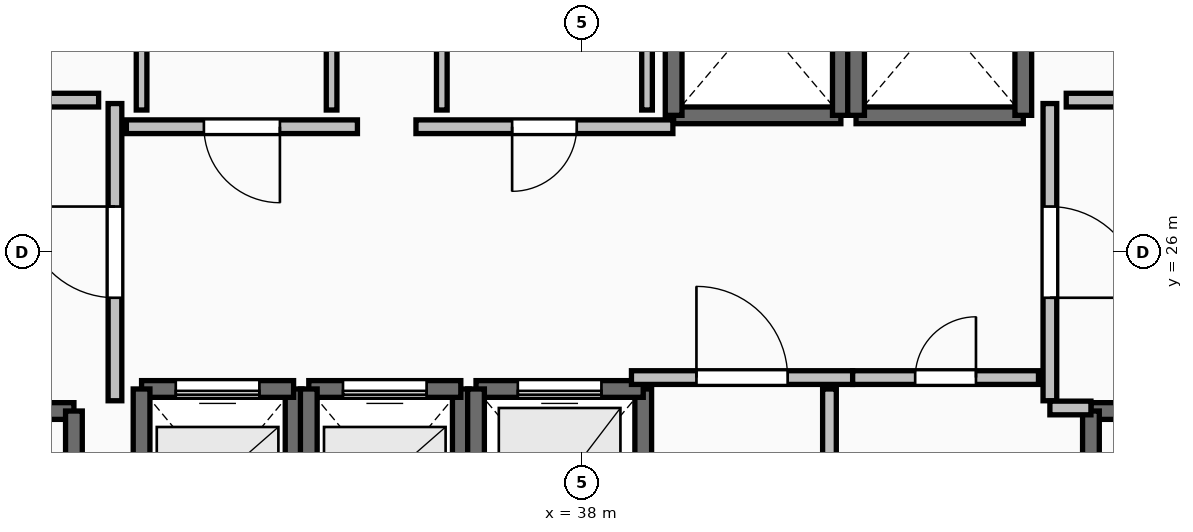
"""IFC4 building model, lengths in metres.
Left out: names, types, materials, properties, quantities, classifications, styles, units other than length and angle.
Written with IfcOpenShell. Run it as: python <this file> out.ifc"""

import sys

from ifc_helpers import new_model, si_unit, direction, frame, frame_2d, origin, place, context, subcontext, project, spatial, rectangle, extrude, element, fill, save


model = new_model("IFC4")
c1 = context("Model", 3, precision=1e-05, world=origin(), true_north=direction((0.0, 1.0)))
c2 = subcontext(c1, "Body", "Model", "MODEL_VIEW")
j1 = project(units=[si_unit("LENGTHUNIT", "METRE"), si_unit("PLANEANGLEUNIT", "RADIAN")], contexts=[c1])
p1 = place(None, origin())
s1 = spatial("IfcSite", under=j1, at=p1, CompositionType="ELEMENT")
p2 = place(p1, origin())
s2 = spatial("IfcBuilding", under=s1, at=p2, CompositionType="ELEMENT")
p3 = place(p2, frame((0.0, 0.0, 171.1)))
s3 = spatial("IfcBuildingStorey", under=s2, at=p3, CompositionType="ELEMENT", Elevation=171.1)
p4 = place(p3, frame((27.94, 23.91, 0.0), z_axis=(0.0, 0.0, 1.0), x_axis=(1.0, 0.0, 0.0)))
e1 = element("IfcWall", 1, at=p4, inside=s3, PredefinedType="SOLIDWALL", context=c2, shape_type="SweptSolid", body=[
    extrude(rectangle(XDim=3.37, YDim=0.22, at=frame_2d((1.685, 0.0))), origin(), (0.0, 0.0, 1.0), 3.2),
])
p5 = place(p4, frame((1.135, 0.0, 0.0)))
e2 = element("IfcOpeningElement", 2, at=p5, cuts=e1, PredefinedType="OPENING", context=c2, shape_type="SweptSolid", body=[
    extrude(rectangle(XDim=1.1, YDim=2.15, at=frame_2d((0.55, 1.075))), frame((0.0, 0.125, 0.0), z_axis=(0.0, -1.0, 0.0), x_axis=(1.0, 0.0, 0.0)), (0.0, 0.0, 1.0), 0.25),
])
p6 = place(p3, frame((31.31, 23.91, 0.0), z_axis=(0.0, 0.0, 1.0), x_axis=(0.0, -1.0, 0.0)))
e3 = element("IfcWall", 3, at=p6, inside=s3, PredefinedType="SOLIDWALL", context=c2, shape_type="SweptSolid", body=[
    extrude(rectangle(XDim=7.42, YDim=0.22, at=frame_2d((3.71, 0.0))), origin(), (0.0, 0.0, 1.0), 3.2),
])
p7 = place(p3, frame((44.69, 23.91, 0.0), z_axis=(0.0, 0.0, 1.0), x_axis=(1.0, 0.0, 0.0)))
e4 = element("IfcWall", 4, at=p7, inside=s3, PredefinedType="SOLIDWALL", context=c2, shape_type="SweptSolid", body=[
    extrude(rectangle(XDim=3.37, YDim=0.22, at=frame_2d((1.685, 0.0))), origin(), (0.0, 0.0, 1.0), 3.2),
])
p8 = place(p7, frame((1.135, 0.0, 0.0)))
e5 = element("IfcOpeningElement", 5, at=p8, cuts=e4, PredefinedType="OPENING", context=c2, shape_type="SweptSolid", body=[
    extrude(rectangle(XDim=1.1, YDim=2.15, at=frame_2d((0.55, 1.075))), frame((0.0, 0.125, 0.0), z_axis=(0.0, -1.0, 0.0), x_axis=(1.0, 0.0, 0.0)), (0.0, 0.0, 1.0), 0.25),
])
p9 = place(p3, frame((44.69, 16.49, 0.0), z_axis=(0.0, 0.0, 1.0), x_axis=(0.0, 1.0, 0.0)))
e6 = element("IfcWall", 6, at=p9, inside=s3, PredefinedType="SOLIDWALL", context=c2, shape_type="SweptSolid", body=[
    extrude(rectangle(XDim=7.42, YDim=0.22, at=frame_2d((3.71, 0.0))), origin(), (0.0, 0.0, 1.0), 3.2),
])
p10 = place(p3, frame((34.2, 21.8, 0.0), z_axis=(0.0, 0.0, 1.0), x_axis=(0.0, 1.0, 0.0)))
e7 = element("IfcWall", 7, at=p10, inside=s3, PredefinedType="SOLIDWALL", context=c2, shape_type="SweptSolid", body=[
    extrude(rectangle(XDim=2.4, YDim=0.22, at=frame_2d((1.2, 0.0))), origin(), (0.0, 0.0, 1.0), 3.2),
])
p11 = place(p3, frame((34.2, 24.2, 0.0), z_axis=(0.0, 0.0, 1.0), x_axis=(-1.0, 0.0, 0.0)))
e8 = element("IfcWall", 8, at=p11, inside=s3, PredefinedType="SOLIDWALL", context=c2, shape_type="SweptSolid", body=[
    extrude(rectangle(XDim=2.0, YDim=0.22, at=frame_2d((1.0, 0.0))), origin(), (0.0, 0.0, 1.0), 3.2),
])
p12 = place(p11, frame((0.45, 0.0, 0.0)))
e9 = element("IfcOpeningElement", 9, at=p12, cuts=e8, PredefinedType="OPENING", context=c2, shape_type="SweptSolid", body=[
    extrude(rectangle(XDim=1.1, YDim=2.2, at=frame_2d((0.55, 1.1))), frame((0.0, 0.125, 0.0), z_axis=(0.0, -1.0, 0.0), x_axis=(1.0, 0.0, 0.0)), (0.0, 0.0, 1.0), 0.25),
])
for number, where, z_axis, x_axis in (
    (10, (32.2, 24.2, 0.0), (0.0, 0.0, 1.0), (0.0, -1.0, 0.0)),
    (11, (36.4, 21.8, 0.0), (0.0, 0.0, 1.0), (0.0, 1.0, 0.0)),
):
    element("IfcWall", number, at=place(p3, frame(where, z_axis=z_axis, x_axis=x_axis)), inside=s3, PredefinedType="SOLIDWALL", context=c2, shape_type="SweptSolid", body=[
        extrude(rectangle(XDim=2.4, YDim=0.22, at=frame_2d((1.2, 0.0))), origin(), (0.0, 0.0, 1.0), 3.2),
    ])
p13 = place(p3, frame((36.4, 24.2, 0.0), z_axis=(0.0, 0.0, 1.0), x_axis=(-1.0, 0.0, 0.0)))
e12 = element("IfcWall", 12, at=p13, inside=s3, PredefinedType="SOLIDWALL", context=c2, shape_type="SweptSolid", body=[
    extrude(rectangle(XDim=2.0, YDim=0.22, at=frame_2d((1.0, 0.0))), origin(), (0.0, 0.0, 1.0), 3.2),
])
p14 = place(p13, frame((0.45, 0.0, 0.0)))
e13 = element("IfcOpeningElement", 13, at=p14, cuts=e12, PredefinedType="OPENING", context=c2, shape_type="SweptSolid", body=[
    extrude(rectangle(XDim=1.1, YDim=2.2, at=frame_2d((0.55, 1.1))), frame((0.0, 0.125, 0.0), z_axis=(0.0, -1.0, 0.0), x_axis=(1.0, 0.0, 0.0)), (0.0, 0.0, 1.0), 0.25),
])
p15 = place(p3, frame((34.4, 24.2, 0.0), z_axis=(0.0, 0.0, 1.0), x_axis=(0.0, -1.0, 0.0)))
e14 = element("IfcWall", 14, at=p15, inside=s3, PredefinedType="SOLIDWALL", context=c2, shape_type="SweptSolid", body=[
    extrude(rectangle(XDim=2.4, YDim=0.22, at=frame_2d((1.2, 0.0))), origin(), (0.0, 0.0, 1.0), 3.2),
])
p16 = place(p3, frame((38.8, 21.6, 0.0), z_axis=(0.0, 0.0, 1.0), x_axis=(0.0, 1.0, 0.0)))
e15 = element("IfcWall", 15, at=p16, inside=s3, PredefinedType="SOLIDWALL", context=c2, shape_type="SweptSolid", body=[
    extrude(rectangle(XDim=2.6, YDim=0.22, at=frame_2d((1.3, 0.0))), origin(), (0.0, 0.0, 1.0), 3.2),
])
p17 = place(p3, frame((38.8, 24.2, 0.0), z_axis=(0.0, 0.0, 1.0), x_axis=(-1.0, 0.0, 0.0)))
e16 = element("IfcWall", 16, at=p17, inside=s3, PredefinedType="SOLIDWALL", context=c2, shape_type="SweptSolid", body=[
    extrude(rectangle(XDim=2.2, YDim=0.22, at=frame_2d((1.1, 0.0))), origin(), (0.0, 0.0, 1.0), 3.2),
])
p18 = place(p17, frame((0.55, 0.0, 0.0)))
e17 = element("IfcOpeningElement", 17, at=p18, cuts=e16, PredefinedType="OPENING", context=c2, shape_type="SweptSolid", body=[
    extrude(rectangle(XDim=1.1, YDim=2.2, at=frame_2d((0.55, 1.1))), frame((0.0, 0.125, 0.0), z_axis=(0.0, -1.0, 0.0), x_axis=(1.0, 0.0, 0.0)), (0.0, 0.0, 1.0), 0.25),
])
p19 = place(p3, frame((36.6, 24.2, 0.0), z_axis=(0.0, 0.0, 1.0), x_axis=(0.0, -1.0, 0.0)))
e18 = element("IfcWall", 18, at=p19, inside=s3, PredefinedType="SOLIDWALL", context=c2, shape_type="SweptSolid", body=[
    extrude(rectangle(XDim=2.6, YDim=0.22, at=frame_2d((1.3, 0.0))), origin(), (0.0, 0.0, 1.0), 3.2),
])
p20 = place(p3, frame((39.2, 27.8, 0.0), z_axis=(0.0, 0.0, 1.0), x_axis=(1.0, 0.0, 0.0)))
e19 = element("IfcWall", 19, at=p20, inside=s3, PredefinedType="SOLIDWALL", context=c2, shape_type="SweptSolid", body=[
    extrude(rectangle(XDim=2.2, YDim=0.22, at=frame_2d((1.1, 0.0))), origin(), (0.0, 0.0, 1.0), 3.2),
])
for number, where, z_axis, x_axis in (
    (20, (41.4, 27.8, 0.0), (0.0, 0.0, 1.0), (0.0, 1.0, 0.0)),
    (21, (39.2, 30.4, 0.0), (0.0, 0.0, 1.0), (0.0, -1.0, 0.0)),
):
    element("IfcWall", number, at=place(p3, frame(where, z_axis=z_axis, x_axis=x_axis)), inside=s3, PredefinedType="SOLIDWALL", context=c2, shape_type="SweptSolid", body=[
        extrude(rectangle(XDim=2.6, YDim=0.22, at=frame_2d((1.3, 0.0))), origin(), (0.0, 0.0, 1.0), 3.2),
    ])
p21 = place(p3, frame((41.6, 27.8, 0.0), z_axis=(0.0, 0.0, 1.0), x_axis=(1.0, 0.0, 0.0)))
e22 = element("IfcWall", 22, at=p21, inside=s3, PredefinedType="SOLIDWALL", context=c2, shape_type="SweptSolid", body=[
    extrude(rectangle(XDim=2.2, YDim=0.22, at=frame_2d((1.1, 0.0))), origin(), (0.0, 0.0, 1.0), 3.2),
])
for number, where, z_axis, x_axis in (
    (23, (43.8, 27.8, 0.0), (0.0, 0.0, 1.0), (0.0, 1.0, 0.0)),
    (24, (41.6, 30.4, 0.0), (0.0, 0.0, 1.0), (0.0, -1.0, 0.0)),
):
    element("IfcWall", number, at=place(p3, frame(where, z_axis=z_axis, x_axis=x_axis)), inside=s3, PredefinedType="SOLIDWALL", context=c2, shape_type="SweptSolid", body=[
        extrude(rectangle(XDim=2.6, YDim=0.22, at=frame_2d((1.3, 0.0))), origin(), (0.0, 0.0, 1.0), 3.2),
    ])
p22 = place(p3, frame((31.85, 24.045, 0.0), z_axis=(0.0, 0.0, 1.0), x_axis=(0.0, 1.0, 0.0)))
e25 = element("IfcWall", 25, at=p22, inside=s3, PredefinedType="PARTITIONING", context=c2, shape_type="SweptSolid", body=[
    extrude(rectangle(XDim=3.91, YDim=0.18, at=frame_2d((1.955, 0.0))), origin(), (0.0, 0.0, 1.0), 3.2),
])
p23 = place(p22, frame((1.355, 0.0, 0.0)))
e26 = element("IfcOpeningElement", 26, at=p23, cuts=e25, PredefinedType="OPENING", context=c2, shape_type="SweptSolid", body=[
    extrude(rectangle(XDim=1.2, YDim=2.15, at=frame_2d((0.6, 1.075))), frame((0.0, 0.105, 0.0), z_axis=(0.0, -1.0, 0.0), x_axis=(1.0, 0.0, 0.0)), (0.0, 0.0, 1.0), 0.21),
])
p24 = place(p3, frame((44.15, 27.955, 0.0), z_axis=(0.0, 0.0, 1.0), x_axis=(0.0, -1.0, 0.0)))
e27 = element("IfcWall", 27, at=p24, inside=s3, PredefinedType="PARTITIONING", context=c2, shape_type="SweptSolid", body=[
    extrude(rectangle(XDim=3.91, YDim=0.18, at=frame_2d((1.955, 0.0))), origin(), (0.0, 0.0, 1.0), 3.2),
])
p25 = place(p24, frame((1.355, 0.0, 0.0)))
e28 = element("IfcOpeningElement", 28, at=p25, cuts=e27, PredefinedType="OPENING", context=c2, shape_type="SweptSolid", body=[
    extrude(rectangle(XDim=1.2, YDim=2.15, at=frame_2d((0.6, 1.075))), frame((0.0, 0.105, 0.0), z_axis=(0.0, -1.0, 0.0), x_axis=(1.0, 0.0, 0.0)), (0.0, 0.0, 1.0), 0.21),
])
p26 = place(p3, frame((44.15, 23.95, 0.0), z_axis=(0.0, 0.0, 1.0), x_axis=(1.0, 0.0, 0.0)))
e29 = element("IfcWall", 29, at=p26, inside=s3, PredefinedType="PARTITIONING", context=c2, shape_type="SweptSolid", body=[
    extrude(rectangle(XDim=0.54, YDim=0.18, at=frame_2d((0.27, 0.0))), origin(), (0.0, 0.0, 1.0), 3.2),
])
p27 = place(p3, frame((38.645, 24.35, 0.0), z_axis=(0.0, 0.0, 1.0), x_axis=(1.0, 0.0, 0.0)))
e30 = element("IfcWall", 30, at=p27, inside=s3, PredefinedType="PARTITIONING", context=c2, shape_type="SweptSolid", body=[
    extrude(rectangle(XDim=2.91, YDim=0.18, at=frame_2d((1.455, 0.0))), origin(), (0.0, 0.0, 1.0), 3.2),
])
p28 = place(p27, frame((0.855, 0.0, 0.0)))
e31 = element("IfcOpeningElement", 31, at=p28, cuts=e30, PredefinedType="OPENING", context=c2, shape_type="SweptSolid", body=[
    extrude(rectangle(XDim=1.2, YDim=2.15, at=frame_2d((0.6, 1.075))), frame((0.0, 0.105, 0.0), z_axis=(0.0, -1.0, 0.0), x_axis=(1.0, 0.0, 0.0)), (0.0, 0.0, 1.0), 0.21),
])
p29 = place(p3, frame((41.555, 24.35, 0.0), z_axis=(0.0, 0.0, 1.0), x_axis=(1.0, 0.0, 0.0)))
e32 = element("IfcWall", 32, at=p29, inside=s3, PredefinedType="PARTITIONING", context=c2, shape_type="SweptSolid", body=[
    extrude(rectangle(XDim=2.445, YDim=0.18, at=frame_2d((1.223, 0.0))), origin(), (0.0, 0.0, 1.0), 3.2),
])
p30 = place(p29, frame((0.823, 0.0, 0.0)))
e33 = element("IfcOpeningElement", 33, at=p30, cuts=e32, PredefinedType="OPENING", context=c2, shape_type="SweptSolid", body=[
    extrude(rectangle(XDim=0.8, YDim=2.05, at=frame_2d((0.4, 1.025))), frame((0.0, 0.105, 0.0), z_axis=(0.0, -1.0, 0.0), x_axis=(1.0, 0.0, 0.0)), (0.0, 0.0, 1.0), 0.21),
])
p31 = place(p3, frame((35.04, 27.65, 0.0), z_axis=(0.0, 0.0, 1.0), x_axis=(-1.0, 0.0, 0.0)))
e34 = element("IfcWall", 34, at=p31, inside=s3, PredefinedType="PARTITIONING", context=c2, shape_type="SweptSolid", body=[
    extrude(rectangle(XDim=3.04, YDim=0.18, at=frame_2d((1.52, 0.0))), origin(), (0.0, 0.0, 1.0), 3.2),
])
p32 = place(p31, frame((1.02, 0.0, 0.0)))
e35 = element("IfcOpeningElement", 35, at=p32, cuts=e34, PredefinedType="OPENING", context=c2, shape_type="SweptSolid", body=[
    extrude(rectangle(XDim=1.0, YDim=2.15, at=frame_2d((0.5, 1.075))), frame((0.0, 0.105, 0.0), z_axis=(0.0, -1.0, 0.0), x_axis=(1.0, 0.0, 0.0)), (0.0, 0.0, 1.0), 0.21),
])
p33 = place(p3, frame((39.19, 27.65, 0.0), z_axis=(0.0, 0.0, 1.0), x_axis=(-1.0, 0.0, 0.0)))
e36 = element("IfcWall", 36, at=p33, inside=s3, PredefinedType="PARTITIONING", context=c2, shape_type="SweptSolid", body=[
    extrude(rectangle(XDim=3.38, YDim=0.18, at=frame_2d((1.69, 0.0))), origin(), (0.0, 0.0, 1.0), 3.2),
])
p34 = place(p33, frame((1.265, 0.0, 0.0)))
e37 = element("IfcOpeningElement", 37, at=p34, cuts=e36, PredefinedType="OPENING", context=c2, shape_type="SweptSolid", body=[
    extrude(rectangle(XDim=0.85, YDim=2.1, at=frame_2d((0.425, 1.05))), frame((0.0, 0.105, 0.0), z_axis=(0.0, -1.0, 0.0), x_axis=(1.0, 0.0, 0.0)), (0.0, 0.0, 1.0), 0.21),
])
p35 = place(p3, frame((41.25, 16.32, 0.0), z_axis=(0.0, 0.0, 1.0), x_axis=(0.0, 1.0, 0.0)))
e38 = element("IfcWall", 38, at=p35, inside=s3, PredefinedType="PARTITIONING", context=c2, shape_type="SweptSolid", body=[
    extrude(rectangle(XDim=7.88, YDim=0.18, at=frame_2d((3.94, 0.0))), origin(), (0.0, 0.0, 1.0), 3.2),
])
p36 = place(p35, frame((3.54, 0.0, 0.0)))
e39 = element("IfcOpeningElement", 39, at=p36, cuts=e38, PredefinedType="OPENING", context=c2, shape_type="SweptSolid", body=[
    extrude(rectangle(XDim=0.8, YDim=2.05, at=frame_2d((0.4, 1.025))), frame((0.0, 0.105, 0.0), z_axis=(0.0, -1.0, 0.0), x_axis=(1.0, 0.0, 0.0)), (0.0, 0.0, 1.0), 0.21),
])
for number, where, z_axis, x_axis in (
    (40, (31.635, 28.0, 0.0), (0.0, 0.0, 1.0), (-1.0, 0.0, 0.0)),
    (41, (45.28, 28.0, 0.0), (0.0, 0.0, 1.0), (-1.0, 0.0, 0.0)),
):
    element("IfcWall", number, at=place(p3, frame(where, z_axis=z_axis, x_axis=x_axis)), inside=s3, PredefinedType="PARTITIONING", context=c2, shape_type="SweptSolid", body=[
        extrude(rectangle(XDim=0.915, YDim=0.18, at=frame_2d((0.458, 0.0))), origin(), (0.0, 0.0, 1.0), 3.2),
    ])
for number, where, z_axis, x_axis in (
    (42, (32.2, 30.26, 0.0), (0.0, 0.0, 1.0), (0.0, -1.0, 0.0)),
    (43, (34.7, 27.87, 0.0), (0.0, 0.0, 1.0), (0.0, 1.0, 0.0)),
):
    element("IfcWall", number, at=place(p3, frame(where, z_axis=z_axis, x_axis=x_axis)), inside=s3, PredefinedType="PARTITIONING", context=c2, shape_type="SweptSolid", body=[
        extrude(rectangle(XDim=2.39, YDim=0.14, at=frame_2d((1.195, 0.0))), origin(), (0.0, 0.0, 1.0), 3.2),
    ])
p37 = place(p3, frame((36.15, 30.03, 0.0), z_axis=(0.0, 0.0, 1.0), x_axis=(0.0, -1.0, 0.0)))
e44 = element("IfcWall", 44, at=p37, inside=s3, PredefinedType="PARTITIONING", context=c2, shape_type="SweptSolid", body=[
    extrude(rectangle(XDim=2.16, YDim=0.14, at=frame_2d((1.08, 0.0))), origin(), (0.0, 0.0, 1.0), 3.2),
])
p38 = place(p3, frame((38.85, 27.87, 0.0), z_axis=(0.0, 0.0, 1.0), x_axis=(0.0, 1.0, 0.0)))
e45 = element("IfcWall", 45, at=p38, inside=s3, PredefinedType="PARTITIONING", context=c2, shape_type="SweptSolid", body=[
    extrude(rectangle(XDim=2.39, YDim=0.14, at=frame_2d((1.195, 0.0))), origin(), (0.0, 0.0, 1.0), 3.2),
])
p39 = place(p12, origin())
e46 = element("IfcDoor", 46, at=p39, inside=s3, OperationType="SLIDING_TO_LEFT", PredefinedType="DOOR", context=c2, shape_type="SweptSolid", body=[
    extrude(rectangle(XDim=1.1, YDim=2.2, at=frame_2d((0.55, 1.1))), frame((0.0, 0.025, 0.0), z_axis=(0.0, -1.0, 0.0), x_axis=(1.0, 0.0, 0.0)), (0.0, 0.0, 1.0), 0.05),
])
fill(e9, e46)
p40 = place(p14, origin())
e47 = element("IfcDoor", 47, at=p40, inside=s3, OperationType="SLIDING_TO_LEFT", PredefinedType="DOOR", context=c2, shape_type="SweptSolid", body=[
    extrude(rectangle(XDim=1.1, YDim=2.2, at=frame_2d((0.55, 1.1))), frame((0.0, 0.025, 0.0), z_axis=(0.0, -1.0, 0.0), x_axis=(1.0, 0.0, 0.0)), (0.0, 0.0, 1.0), 0.05),
])
fill(e13, e47)
p41 = place(p18, origin())
e48 = element("IfcDoor", 48, at=p41, inside=s3, OperationType="SLIDING_TO_LEFT", PredefinedType="DOOR", context=c2, shape_type="SweptSolid", body=[
    extrude(rectangle(XDim=1.1, YDim=2.2, at=frame_2d((0.55, 1.1))), frame((0.0, 0.025, 0.0), z_axis=(0.0, -1.0, 0.0), x_axis=(1.0, 0.0, 0.0)), (0.0, 0.0, 1.0), 0.05),
])
fill(e17, e48)
p42 = place(p23, origin())
e49 = element("IfcDoor", 49, at=p42, inside=s3, OperationType="SINGLE_SWING_RIGHT", PredefinedType="DOOR", context=c2, shape_type="SweptSolid", body=[
    extrude(rectangle(XDim=1.2, YDim=2.15, at=frame_2d((0.6, 1.075))), frame((0.0, 0.025, 0.0), z_axis=(0.0, -1.0, 0.0), x_axis=(1.0, 0.0, 0.0)), (0.0, 0.0, 1.0), 0.05),
])
fill(e26, e49)
p43 = place(p25, origin())
e50 = element("IfcDoor", 50, at=p43, inside=s3, OperationType="SINGLE_SWING_RIGHT", PredefinedType="DOOR", context=c2, shape_type="SweptSolid", body=[
    extrude(rectangle(XDim=1.2, YDim=2.15, at=frame_2d((0.6, 1.075))), frame((0.0, 0.025, 0.0), z_axis=(0.0, -1.0, 0.0), x_axis=(1.0, 0.0, 0.0)), (0.0, 0.0, 1.0), 0.05),
])
fill(e28, e50)
p44 = place(p28, origin())
e51 = element("IfcDoor", 51, at=p44, inside=s3, OperationType="SINGLE_SWING_LEFT", PredefinedType="DOOR", context=c2, shape_type="SweptSolid", body=[
    extrude(rectangle(XDim=1.2, YDim=2.15, at=frame_2d((0.6, 1.075))), frame((0.0, 0.025, 0.0), z_axis=(0.0, -1.0, 0.0), x_axis=(1.0, 0.0, 0.0)), (0.0, 0.0, 1.0), 0.05),
])
fill(e31, e51)
p45 = place(p30, origin())
e52 = element("IfcDoor", 52, at=p45, inside=s3, OperationType="SINGLE_SWING_RIGHT", PredefinedType="DOOR", context=c2, shape_type="SweptSolid", body=[
    extrude(rectangle(XDim=0.8, YDim=2.05, at=frame_2d((0.4, 1.025))), frame((0.0, 0.025, 0.0), z_axis=(0.0, -1.0, 0.0), x_axis=(1.0, 0.0, 0.0)), (0.0, 0.0, 1.0), 0.05),
])
fill(e33, e52)
p46 = place(p32, origin())
e53 = element("IfcDoor", 53, at=p46, inside=s3, OperationType="SINGLE_SWING_LEFT", PredefinedType="DOOR", context=c2, shape_type="SweptSolid", body=[
    extrude(rectangle(XDim=1.0, YDim=2.15, at=frame_2d((0.5, 1.075))), frame((0.0, 0.025, 0.0), z_axis=(0.0, -1.0, 0.0), x_axis=(1.0, 0.0, 0.0)), (0.0, 0.0, 1.0), 0.05),
])
fill(e35, e53)
p47 = place(p34, origin())
e54 = element("IfcDoor", 54, at=p47, inside=s3, OperationType="SINGLE_SWING_RIGHT", PredefinedType="DOOR", context=c2, shape_type="SweptSolid", body=[
    extrude(rectangle(XDim=0.85, YDim=2.1, at=frame_2d((0.425, 1.05))), frame((0.0, 0.025, 0.0), z_axis=(0.0, -1.0, 0.0), x_axis=(1.0, 0.0, 0.0)), (0.0, 0.0, 1.0), 0.05),
])
fill(e37, e54)
save(model, sys.argv[1])
